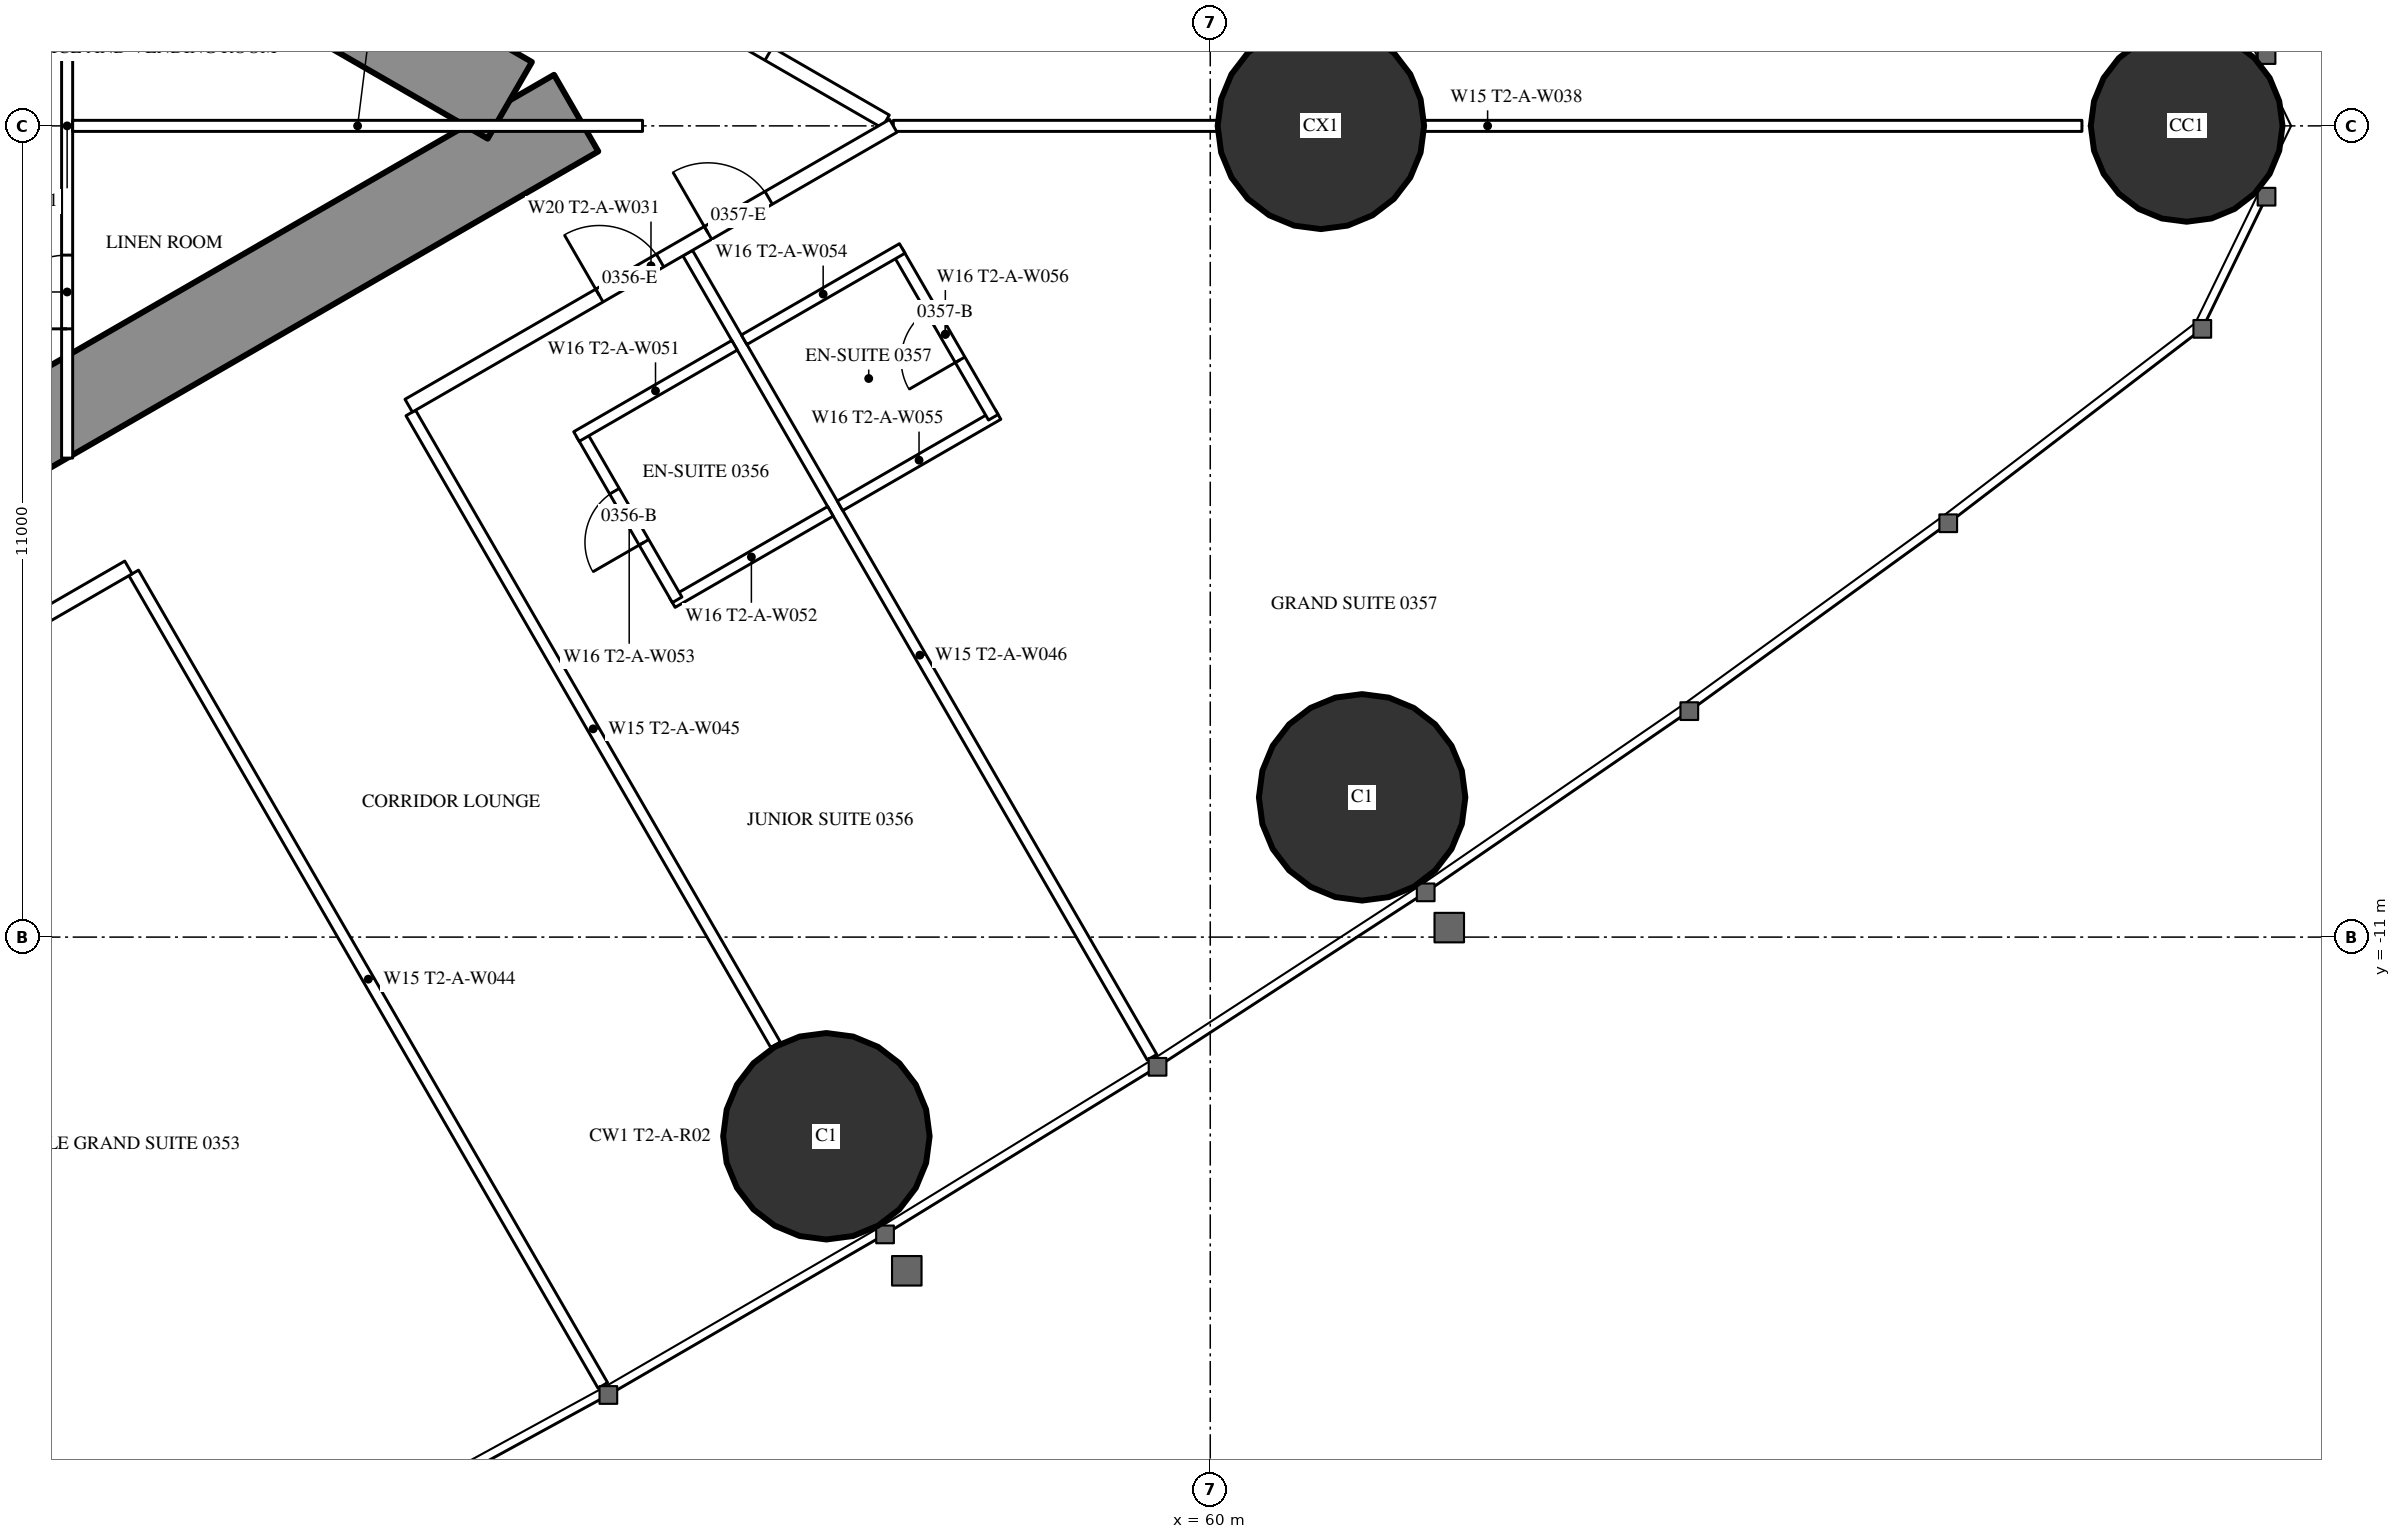
"""IFC4 building model, lengths in metres.
Left out: names, types, materials, properties, quantities, classifications, styles, units other than length and angle.
Written with IfcOpenShell. Run it as: python <this file> out.ifc"""

import sys

from ifc_helpers import new_model, si_unit, direction, frame, frame_2d, origin, origin_2d, place, context, subcontext, project, spatial, rectangle, hollow_circle, extrude, element, fill, save


model = new_model("IFC4")
c1 = context("Model", 3, precision=1e-05, world=origin(), true_north=direction((0.0, 1.0)))
c2 = subcontext(c1, "Body", "Model", "MODEL_VIEW")
j1 = project(units=[si_unit("LENGTHUNIT", "METRE"), si_unit("PLANEANGLEUNIT", "RADIAN")], contexts=[c1])
p1 = place(None, origin())
s1 = spatial("IfcSite", under=j1, at=p1, CompositionType="ELEMENT")
p2 = place(p1, origin())
s2 = spatial("IfcBuilding", under=s1, at=p2, CompositionType="ELEMENT")
p3 = place(p2, frame((0.0, 0.0, 18.0)))
s3 = spatial("IfcBuildingStorey", under=s2, at=p3, CompositionType="ELEMENT", Elevation=18.0)
p4 = place(p3, frame((73.239, 0.0, 0.0), z_axis=(0.0, 0.0, 1.0), x_axis=(1.0, 0.0, 0.0)))
e1 = element("IfcColumn", 1, at=p4, inside=s3, PredefinedType="COLUMN", context=c2, shape_type="SweptSolid", body=[
    extrude(hollow_circle(Radius=1.3, WallThickness=0.1, at=origin_2d()), origin(), (0.0, 0.0, 1.0), 3.5),
])
for number, where, z_axis, x_axis in (
    (2, (54.795, -13.701, 0.0), (0.0, 0.0, 1.0), (1.0, 0.0, 0.0)),
    (3, (62.059, -9.105, 0.0), (0.0, 0.0, 1.0), (1.0, 0.0, 0.0)),
):
    element("IfcColumn", number, at=place(p3, frame(where, z_axis=z_axis, x_axis=x_axis)), inside=s3, PredefinedType="COLUMN", context=c2, shape_type="SweptSolid", body=[
        extrude(hollow_circle(Radius=1.4, WallThickness=0.12, at=origin_2d()), origin(), (0.0, 0.0, 1.0), 3.5),
    ])
p5 = place(p3, frame((61.5, 0.0, 0.0), z_axis=(0.0, 0.0, 1.0), x_axis=(1.0, 0.0, 0.0)))
e4 = element("IfcColumn", 4, at=p5, inside=s3, PredefinedType="COLUMN", context=c2, shape_type="SweptSolid", body=[
    extrude(hollow_circle(Radius=1.4, WallThickness=0.1, at=origin_2d()), origin(), (0.0, 0.0, 1.0), 3.5),
])
p6 = place(p3, frame((27.2, -13.8, 0.0), z_axis=(0.0, 0.0, 1.0), x_axis=(0.866027159892, 0.499996958321, 0.0)))
e5 = element("IfcWall", 5, at=p6, inside=s3, PredefinedType="SHEAR", context=c2, shape_type="SweptSolid", body=[
    extrude(rectangle(XDim=27.947, YDim=1.2, at=frame_2d((13.973, 0.0))), origin(), (0.0, 0.0, 1.0), 3.5),
])
p7 = place(p6, frame((4.6, 0.0, 0.0)))
e6 = element("IfcOpeningElement", 6, at=p7, cuts=e5, PredefinedType="OPENING", context=c2, shape_type="SweptSolid", body=[
    extrude(rectangle(XDim=1.0, YDim=2.2, at=frame_2d((0.5, 1.1))), frame((0.0, 0.61, 0.0), z_axis=(0.0, -1.0, 0.0), x_axis=(1.0, 0.0, 0.0)), (0.0, 0.0, 1.0), 1.22),
])
p8 = place(p6, frame((13.395, 0.0, 0.0)))
e7 = element("IfcOpeningElement", 7, at=p8, cuts=e5, PredefinedType="OPENING", context=c2, shape_type="SweptSolid", body=[
    extrude(rectangle(XDim=1.8, YDim=2.2, at=frame_2d((0.9, 1.1))), frame((0.0, 0.61, 0.0), z_axis=(0.0, -1.0, 0.0), x_axis=(1.0, 0.0, 0.0)), (0.0, 0.0, 1.0), 1.22),
])
p9 = place(p3, frame((27.2, 13.8, 0.0), z_axis=(0.0, 0.0, 1.0), x_axis=(0.866024515034, -0.500001539357, 0.0)))
e8 = element("IfcWall", 8, at=p9, inside=s3, PredefinedType="SHEAR", context=c2, shape_type="SweptSolid", body=[
    extrude(rectangle(XDim=26.907, YDim=1.2, at=frame_2d((13.454, 0.0))), origin(), (0.0, 0.0, 1.0), 3.5),
])
p10 = place(p9, frame((4.6, 0.0, 0.0)))
e9 = element("IfcOpeningElement", 9, at=p10, cuts=e8, PredefinedType="OPENING", context=c2, shape_type="SweptSolid", body=[
    extrude(rectangle(XDim=1.0, YDim=2.2, at=frame_2d((0.5, 1.1))), frame((0.0, 0.61, 0.0), z_axis=(0.0, -1.0, 0.0), x_axis=(1.0, 0.0, 0.0)), (0.0, 0.0, 1.0), 1.22),
])
p11 = place(p9, frame((13.395, 0.0, 0.0)))
e10 = element("IfcOpeningElement", 10, at=p11, cuts=e8, PredefinedType="OPENING", context=c2, shape_type="SweptSolid", body=[
    extrude(rectangle(XDim=1.8, YDim=2.2, at=frame_2d((0.9, 1.1))), frame((0.0, 0.61, 0.0), z_axis=(0.0, -1.0, 0.0), x_axis=(1.0, 0.0, 0.0)), (0.0, 0.0, 1.0), 1.22),
])
p12 = place(p3, frame((45.403, -6.062, 0.0), z_axis=(0.0, 0.0, 1.0), x_axis=(0.500007077968, -0.866021317279, 0.0)))
e11 = element("IfcWall", 11, at=p12, inside=s3, PredefinedType="PARTITIONING", context=c2, shape_type="SweptSolid", body=[
    extrude(rectangle(XDim=12.721, YDim=0.15, at=frame_2d((6.361, 0.0))), origin(), (0.0, 0.0, 1.0), 3.25),
])
p13 = place(p3, frame((49.159, -3.893, 0.0), z_axis=(0.0, 0.0, 1.0), x_axis=(0.499998773722, -0.866026111775, 0.0)))
e12 = element("IfcWall", 12, at=p13, inside=s3, PredefinedType="PARTITIONING", context=c2, shape_type="SweptSolid", body=[
    extrude(rectangle(XDim=9.892, YDim=0.15, at=frame_2d((4.946, 0.0))), origin(), (0.0, 0.0, 1.0), 2.25),
])
p14 = place(p3, frame((52.915, -1.725, 0.0), z_axis=(0.0, 0.0, 1.0), x_axis=(0.499997163113, -0.866027041656, 0.0)))
e13 = element("IfcWall", 13, at=p14, inside=s3, PredefinedType="PARTITIONING", context=c2, shape_type="SweptSolid", body=[
    extrude(rectangle(XDim=12.591, YDim=0.15, at=frame_2d((6.295, 0.0))), origin(), (0.0, 0.0, 1.0), 3.25),
])
p15 = place(p3, frame((55.702, 0.0, 0.0), z_axis=(0.0, 0.0, 1.0), x_axis=(1.0, 0.0, 0.0)))
e14 = element("IfcWall", 14, at=p15, inside=s3, PredefinedType="PARTITIONING", context=c2, shape_type="SweptSolid", body=[
    extrude(rectangle(XDim=16.117, YDim=0.15, at=frame_2d((8.059, 0.0))), origin(), (0.0, 0.0, 1.0), 2.25),
])
p16 = place(p3, frame((36.834, 10.894, 0.0), z_axis=(0.0, 0.0, 1.0), x_axis=(0.866028157229, -0.499995230863, 0.0)))
e15 = element("IfcWall", 15, at=p16, inside=s3, PredefinedType="PARTITIONING", context=c2, shape_type="SweptSolid", body=[
    extrude(rectangle(XDim=21.667, YDim=0.2, at=frame_2d((10.833, 0.0))), origin(), (0.0, 0.0, 1.0), 3.25),
])
p17 = place(p16, frame((18.885, 0.0, 0.0)))
e16 = element("IfcOpeningElement", 16, at=p17, cuts=e15, PredefinedType="OPENING", context=c2, shape_type="SweptSolid", body=[
    extrude(rectangle(XDim=0.95, YDim=2.2, at=frame_2d((0.475, 1.1))), frame((0.0, 0.11, 0.0), z_axis=(0.0, -1.0, 0.0), x_axis=(1.0, 0.0, 0.0)), (0.0, 0.0, 1.0), 0.22),
])
p18 = place(p16, frame((14.835, 0.0, 0.0)))
e17 = element("IfcOpeningElement", 17, at=p18, cuts=e15, PredefinedType="OPENING", context=c2, shape_type="SweptSolid", body=[
    extrude(rectangle(XDim=0.95, YDim=2.2, at=frame_2d((0.475, 1.1))), frame((0.0, 0.11, 0.0), z_axis=(0.0, -1.0, 0.0), x_axis=(1.0, 0.0, 0.0)), (0.0, 0.0, 1.0), 0.22),
])
p19 = place(p16, frame((12.85, 0.0, 0.0)))
e18 = element("IfcOpeningElement", 18, at=p19, cuts=e15, PredefinedType="OPENING", context=c2, shape_type="SweptSolid", body=[
    extrude(rectangle(XDim=0.95, YDim=2.2, at=frame_2d((0.475, 1.1))), frame((0.0, 0.11, 0.0), z_axis=(0.0, -1.0, 0.0), x_axis=(1.0, 0.0, 0.0)), (0.0, 0.0, 1.0), 0.22),
])
p20 = place(p16, frame((1.542, 0.0, 0.0)))
e19 = element("IfcOpeningElement", 19, at=p20, cuts=e15, PredefinedType="OPENING", context=c2, shape_type="SweptSolid", body=[
    extrude(rectangle(XDim=0.95, YDim=2.2, at=frame_2d((0.475, 1.1))), frame((0.0, 0.11, 0.0), z_axis=(0.0, -1.0, 0.0), x_axis=(1.0, 0.0, 0.0)), (0.0, 0.0, 1.0), 0.22),
])
p21 = place(p3, frame((37.96, -10.243, 0.0), z_axis=(0.0, 0.0, 1.0), x_axis=(0.866024617314, 0.500001362204, 0.0)))
e20 = element("IfcWall", 20, at=p21, inside=s3, PredefinedType="PARTITIONING", context=c2, shape_type="SweptSolid", body=[
    extrude(rectangle(XDim=8.512, YDim=0.2, at=frame_2d((4.256, 0.0))), origin(), (0.0, 0.0, 1.0), 3.25),
])
p22 = place(p21, frame((3.35, 0.0, 0.0)))
e21 = element("IfcOpeningElement", 21, at=p22, cuts=e20, PredefinedType="OPENING", context=c2, shape_type="SweptSolid", body=[
    extrude(rectangle(XDim=1.0, YDim=2.2, at=frame_2d((0.5, 1.1))), frame((0.0, 0.11, 0.0), z_axis=(0.0, -1.0, 0.0), x_axis=(1.0, 0.0, 0.0)), (0.0, 0.0, 1.0), 0.22),
])
p23 = place(p3, frame((49.131, -3.794, 0.0), z_axis=(0.0, 0.0, 1.0), x_axis=(0.866030732979, 0.499990769451, 0.0)))
e22 = element("IfcWall", 22, at=p23, inside=s3, PredefinedType="PARTITIONING", context=c2, shape_type="SweptSolid", body=[
    extrude(rectangle(XDim=7.588, YDim=0.2, at=frame_2d((3.794, 0.0))), origin(), (0.0, 0.0, 1.0), 3.25),
])
p24 = place(p23, frame((2.986, 0.0, 0.0)))
e23 = element("IfcOpeningElement", 23, at=p24, cuts=e22, PredefinedType="OPENING", context=c2, shape_type="SweptSolid", body=[
    extrude(rectangle(XDim=0.95, YDim=2.2, at=frame_2d((0.475, 1.1))), frame((0.0, 0.11, 0.0), z_axis=(0.0, -1.0, 0.0), x_axis=(1.0, 0.0, 0.0)), (0.0, 0.0, 1.0), 0.22),
])
p25 = place(p23, frame((4.686, 0.0, 0.0)))
e24 = element("IfcOpeningElement", 24, at=p25, cuts=e22, PredefinedType="OPENING", context=c2, shape_type="SweptSolid", body=[
    extrude(rectangle(XDim=0.95, YDim=2.2, at=frame_2d((0.475, 1.1))), frame((0.0, 0.11, 0.0), z_axis=(0.0, -1.0, 0.0), x_axis=(1.0, 0.0, 0.0)), (0.0, 0.0, 1.0), 0.22),
])
p26 = place(p3, frame((52.706, -6.464, 0.0), z_axis=(0.0, 0.0, 1.0), x_axis=(0.86604923931, 0.499958713387, 0.0)))
e25 = element("IfcWall", 25, at=p26, inside=s3, PredefinedType="PARTITIONING", context=c2, shape_type="SweptSolid", body=[
    extrude(rectangle(XDim=2.475, YDim=0.15, at=frame_2d((1.237, 0.0))), origin(), (0.0, 0.0, 1.0), 3.25),
])
p27 = place(p3, frame((51.471, -4.175, 0.0), z_axis=(0.0, 0.0, 1.0), x_axis=(0.500006934395, -0.866021400173, 0.0)))
e26 = element("IfcWall", 26, at=p27, inside=s3, PredefinedType="PARTITIONING", context=c2, shape_type="SweptSolid", body=[
    extrude(rectangle(XDim=2.6, YDim=0.15, at=frame_2d((1.3, 0.0))), origin(), (0.0, 0.0, 1.0), 3.25),
])
p28 = place(p27, frame((0.9, 0.0, 0.0)))
e27 = element("IfcOpeningElement", 27, at=p28, cuts=e26, PredefinedType="OPENING", context=c2, shape_type="SweptSolid", body=[
    extrude(rectangle(XDim=0.8, YDim=2.2, at=frame_2d((0.4, 1.1))), frame((0.0, 0.085, 0.0), z_axis=(0.0, -1.0, 0.0), x_axis=(1.0, 0.0, 0.0)), (0.0, 0.0, 1.0), 0.17),
])
p29 = place(p3, frame((51.406, -4.212, 0.0), z_axis=(0.0, 0.0, 1.0), x_axis=(0.866031185235, 0.4999899861, 0.0)))
e28 = element("IfcWall", 28, at=p29, inside=s3, PredefinedType="PARTITIONING", context=c2, shape_type="SweptSolid", body=[
    extrude(rectangle(XDim=2.475, YDim=0.15, at=frame_2d((1.238, 0.0))), origin(), (0.0, 0.0, 1.0), 3.25),
])
p30 = place(p3, frame((54.98, -5.151, 0.0), z_axis=(0.0, 0.0, 1.0), x_axis=(0.86604923931, 0.499958713387, 0.0)))
e29 = element("IfcWall", 29, at=p30, inside=s3, PredefinedType="PARTITIONING", context=c2, shape_type="SweptSolid", body=[
    extrude(rectangle(XDim=2.475, YDim=0.15, at=frame_2d((1.237, 0.0))), origin(), (0.0, 0.0, 1.0), 3.25),
])
p31 = place(p3, frame((55.758, -1.7, 0.0), z_axis=(0.0, 0.0, 1.0), x_axis=(0.500006934395, -0.866021400173, 0.0)))
e30 = element("IfcWall", 30, at=p31, inside=s3, PredefinedType="PARTITIONING", context=c2, shape_type="SweptSolid", body=[
    extrude(rectangle(XDim=2.6, YDim=0.15, at=frame_2d((1.3, 0.0))), origin(), (0.0, 0.0, 1.0), 3.25),
])
p32 = place(p31, frame((0.9, 0.0, 0.0)))
e31 = element("IfcOpeningElement", 31, at=p32, cuts=e30, PredefinedType="OPENING", context=c2, shape_type="SweptSolid", body=[
    extrude(rectangle(XDim=0.8, YDim=2.2, at=frame_2d((0.4, 1.1))), frame((0.0, 0.085, 0.0), z_axis=(0.0, -1.0, 0.0), x_axis=(1.0, 0.0, 0.0)), (0.0, 0.0, 1.0), 0.17),
])
p33 = place(p3, frame((53.68, -2.9, 0.0), z_axis=(0.0, 0.0, 1.0), x_axis=(0.866006523861, 0.500032699561, 0.0)))
e32 = element("IfcWall", 32, at=p33, inside=s3, PredefinedType="PARTITIONING", context=c2, shape_type="SweptSolid", body=[
    extrude(rectangle(XDim=2.475, YDim=0.15, at=frame_2d((1.237, 0.0))), origin(), (0.0, 0.0, 1.0), 3.25),
])
p34 = place(p3, frame((44.5, -4.505, 0.0), z_axis=(0.0, 0.0, 1.0), x_axis=(0.0, 1.0, 0.0)))
e33 = element("IfcWall", 33, at=p34, inside=s3, PredefinedType="PARTITIONING", context=c2, shape_type="SweptSolid", body=[
    extrude(rectangle(XDim=9.009, YDim=0.15, at=frame_2d((4.505, 0.0))), origin(), (0.0, 0.0, 1.0), 2.35),
])
p35 = place(p34, frame((1.752, 0.0, 0.0)))
e34 = element("IfcOpeningElement", 34, at=p35, cuts=e33, PredefinedType="OPENING", context=c2, shape_type="SweptSolid", body=[
    extrude(rectangle(XDim=1.0, YDim=2.2, at=frame_2d((0.5, 1.1))), frame((0.0, 0.085, 0.0), z_axis=(0.0, -1.0, 0.0), x_axis=(1.0, 0.0, 0.0)), (0.0, 0.0, 1.0), 0.17),
])
p36 = place(p34, frame((6.257, 0.0, 0.0)))
e35 = element("IfcOpeningElement", 35, at=p36, cuts=e33, PredefinedType="OPENING", context=c2, shape_type="SweptSolid", body=[
    extrude(rectangle(XDim=1.0, YDim=2.2, at=frame_2d((0.5, 1.1))), frame((0.0, 0.085, 0.0), z_axis=(0.0, -1.0, 0.0), x_axis=(1.0, 0.0, 0.0)), (0.0, 0.0, 1.0), 0.17),
])
p37 = place(p3, frame((44.575, 0.0, 0.0), z_axis=(0.0, 0.0, 1.0), x_axis=(1.0, 0.0, 0.0)))
e36 = element("IfcWall", 36, at=p37, inside=s3, PredefinedType="PARTITIONING", context=c2, shape_type="SweptSolid", body=[
    extrude(rectangle(XDim=7.727, YDim=0.15, at=frame_2d((3.864, 0.0))), origin(), (0.0, 0.0, 1.0), 2.25),
])
p38 = place(p28, origin())
e37 = element("IfcDoor", 37, at=p38, inside=s3, OperationType="SINGLE_SWING_RIGHT", PredefinedType="DOOR", context=c2, shape_type="SweptSolid", body=[
    extrude(rectangle(XDim=0.8, YDim=2.2, at=frame_2d((0.4, 1.1))), frame((0.0, 0.025, 0.0), z_axis=(0.0, -1.0, 0.0), x_axis=(1.0, 0.0, 0.0)), (0.0, 0.0, 1.0), 0.05),
])
fill(e27, e37)
p39 = place(p24, origin())
e38 = element("IfcDoor", 38, at=p39, inside=s3, OperationType="SINGLE_SWING_LEFT", PredefinedType="DOOR", context=c2, shape_type="SweptSolid", body=[
    extrude(rectangle(XDim=0.95, YDim=2.2, at=frame_2d((0.475, 1.1))), frame((0.0, 0.025, 0.0), z_axis=(0.0, -1.0, 0.0), x_axis=(1.0, 0.0, 0.0)), (0.0, 0.0, 1.0), 0.05),
])
fill(e23, e38)
p40 = place(p32, origin())
e39 = element("IfcDoor", 39, at=p40, inside=s3, OperationType="SINGLE_SWING_RIGHT", PredefinedType="DOOR", context=c2, shape_type="SweptSolid", body=[
    extrude(rectangle(XDim=0.8, YDim=2.2, at=frame_2d((0.4, 1.1))), frame((0.0, 0.025, 0.0), z_axis=(0.0, -1.0, 0.0), x_axis=(1.0, 0.0, 0.0)), (0.0, 0.0, 1.0), 0.05),
])
fill(e31, e39)
p41 = place(p25, origin())
e40 = element("IfcDoor", 40, at=p41, inside=s3, OperationType="SINGLE_SWING_LEFT", PredefinedType="DOOR", context=c2, shape_type="SweptSolid", body=[
    extrude(rectangle(XDim=0.95, YDim=2.2, at=frame_2d((0.475, 1.1))), frame((0.0, 0.025, 0.0), z_axis=(0.0, -1.0, 0.0), x_axis=(1.0, 0.0, 0.0)), (0.0, 0.0, 1.0), 0.05),
])
fill(e24, e40)
p42 = place(p17, origin())
e41 = element("IfcDoor", 41, at=p42, inside=s3, OperationType="SINGLE_SWING_LEFT", PredefinedType="DOOR", context=c2, shape_type="SweptSolid", body=[
    extrude(rectangle(XDim=0.95, YDim=2.2, at=frame_2d((0.475, 1.1))), frame((0.0, 0.025, 0.0), z_axis=(0.0, -1.0, 0.0), x_axis=(1.0, 0.0, 0.0)), (0.0, 0.0, 1.0), 0.05),
])
fill(e16, e41)
p43 = place(p35, origin())
e42 = element("IfcDoor", 42, at=p43, inside=s3, OperationType="SINGLE_SWING_LEFT", PredefinedType="DOOR", context=c2, shape_type="SweptSolid", body=[
    extrude(rectangle(XDim=1.0, YDim=2.2, at=frame_2d((0.5, 1.1))), frame((0.0, 0.025, 0.0), z_axis=(0.0, -1.0, 0.0), x_axis=(1.0, 0.0, 0.0)), (0.0, 0.0, 1.0), 0.05),
])
fill(e34, e42)
save(model, sys.argv[1])
